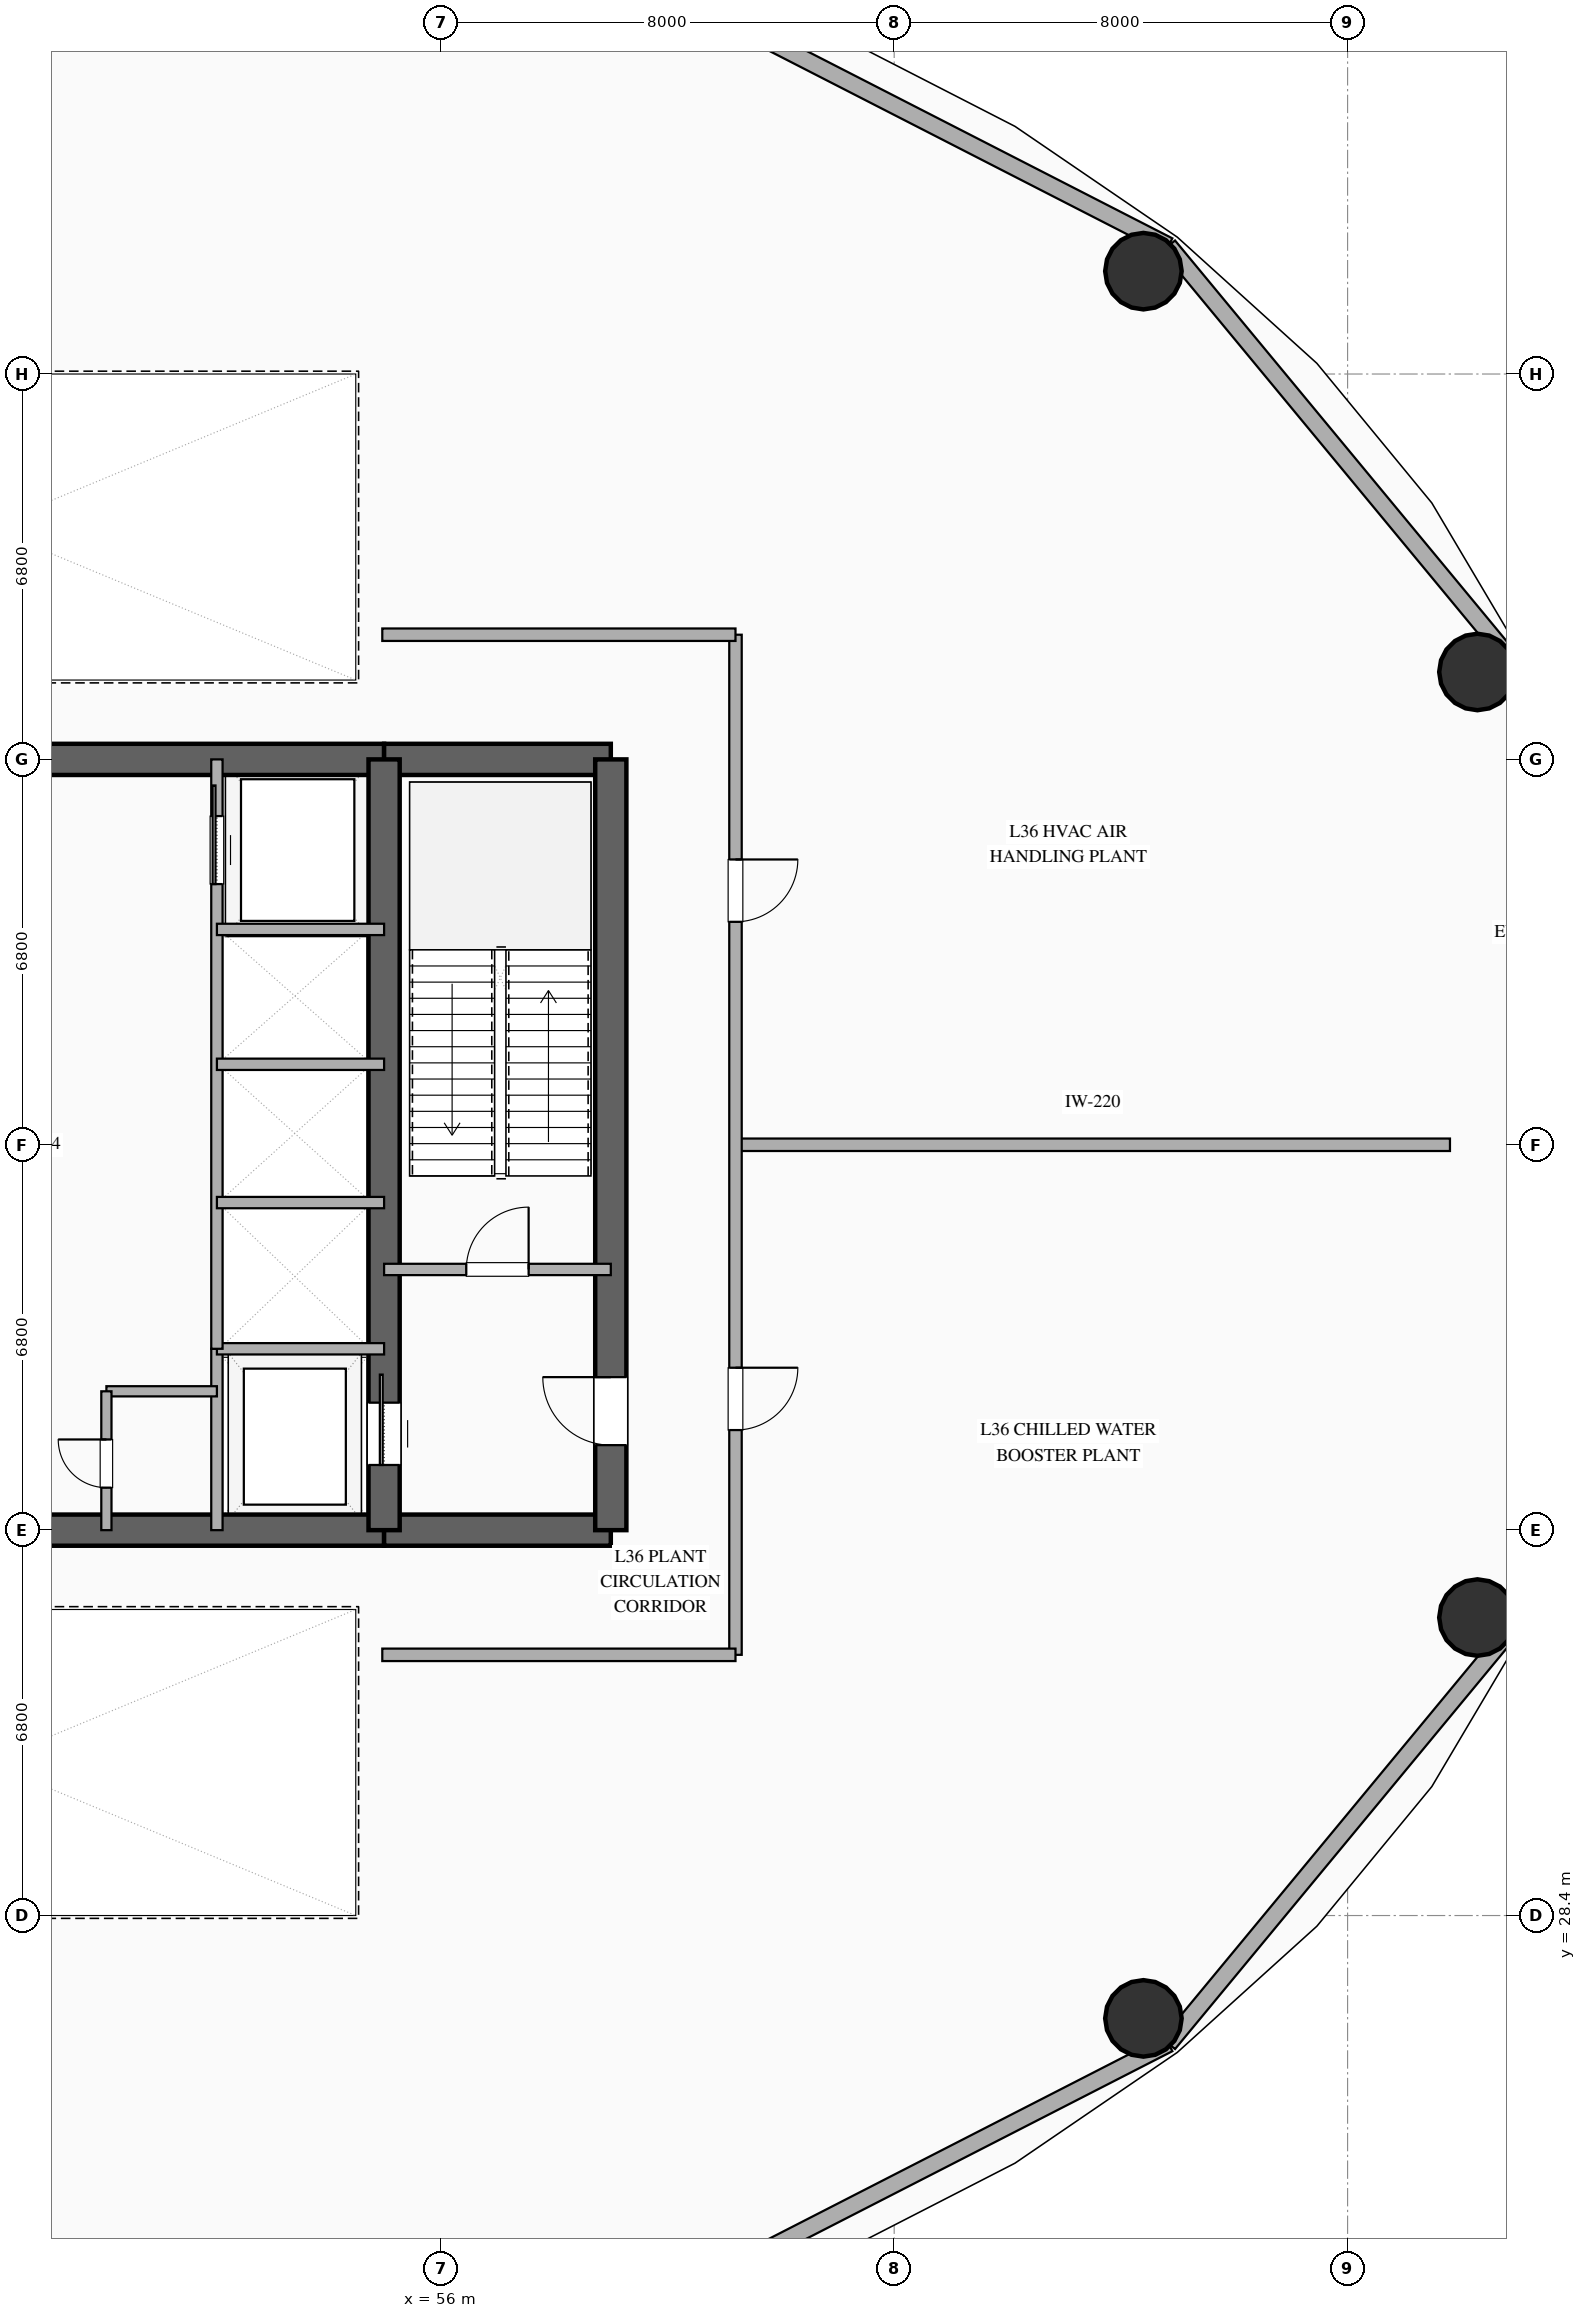
"""IFC4 building model, lengths in metres.
Left out: names, types, materials, properties, quantities, classifications, styles, units other than length and angle.
Written with IfcOpenShell. Run it as: python <this file> out.ifc"""

import sys

from ifc_helpers import new_model, si_unit, direction, frame, frame_2d, origin, origin_2d, place, context, subcontext, project, spatial, rectangle, hollow_circle, extrude, element, fill, save


model = new_model("IFC4")
c1 = context("Model", 3, precision=1e-05, world=origin(), true_north=direction((0.0, 1.0)))
c2 = subcontext(c1, "Body", "Model", "MODEL_VIEW")
j1 = project(units=[si_unit("LENGTHUNIT", "METRE"), si_unit("PLANEANGLEUNIT", "RADIAN")], contexts=[c1])
p1 = place(None, origin())
s1 = spatial("IfcSite", under=j1, at=p1, CompositionType="ELEMENT")
p2 = place(p1, origin())
s2 = spatial("IfcBuilding", under=s1, at=p2, CompositionType="ELEMENT")
p3 = place(p2, frame((0.0, 0.0, 145.2)))
s3 = spatial("IfcBuildingStorey", under=s2, at=p3, CompositionType="ELEMENT", Elevation=145.2)
p4 = place(p3, frame((41.0, 35.2, 0.0), z_axis=(0.0, 0.0, 1.0), x_axis=(1.0, 0.0, 0.0)))
e1 = element("IfcWall", 1, at=p4, inside=s3, PredefinedType="SHEAR", context=c2, shape_type="SweptSolid", body=[
    extrude(rectangle(XDim=14.0, YDim=0.55, at=frame_2d((7.0, 0.0))), origin(), (0.0, 0.0, 1.0), 5.15),
])
p5 = place(p4, frame((6.1, 0.0, 0.0)))
e2 = element("IfcOpeningElement", 2, at=p5, cuts=e1, PredefinedType="OPENING", context=c2, shape_type="SweptSolid", body=[
    extrude(rectangle(XDim=1.8, YDim=2.25, at=frame_2d((0.9, 1.125))), frame((0.0, 0.285, 0.0), z_axis=(0.0, -1.0, 0.0), x_axis=(1.0, 0.0, 0.0)), (0.0, 0.0, 1.0), 0.57),
])
p6 = place(p3, frame((55.0, 35.2, 0.0), z_axis=(0.0, 0.0, 1.0), x_axis=(1.0, 0.0, 0.0)))
e3 = element("IfcWall", 3, at=p6, inside=s3, PredefinedType="SHEAR", context=c2, shape_type="SweptSolid", body=[
    extrude(rectangle(XDim=4.0, YDim=0.55, at=frame_2d((2.0, 0.0))), origin(), (0.0, 0.0, 1.0), 5.15),
])
p7 = place(p3, frame((41.0, 48.8, 0.0), z_axis=(0.0, 0.0, 1.0), x_axis=(1.0, 0.0, 0.0)))
e4 = element("IfcWall", 4, at=p7, inside=s3, PredefinedType="SHEAR", context=c2, shape_type="SweptSolid", body=[
    extrude(rectangle(XDim=14.0, YDim=0.55, at=frame_2d((7.0, 0.0))), origin(), (0.0, 0.0, 1.0), 5.15),
])
p8 = place(p7, frame((6.1, 0.0, 0.0)))
e5 = element("IfcOpeningElement", 5, at=p8, cuts=e4, PredefinedType="OPENING", context=c2, shape_type="SweptSolid", body=[
    extrude(rectangle(XDim=1.8, YDim=2.25, at=frame_2d((0.9, 1.125))), frame((0.0, 0.285, 0.0), z_axis=(0.0, -1.0, 0.0), x_axis=(1.0, 0.0, 0.0)), (0.0, 0.0, 1.0), 0.57),
])
p9 = place(p3, frame((55.0, 48.8, 0.0), z_axis=(0.0, 0.0, 1.0), x_axis=(1.0, 0.0, 0.0)))
e6 = element("IfcWall", 6, at=p9, inside=s3, PredefinedType="SHEAR", context=c2, shape_type="SweptSolid", body=[
    extrude(rectangle(XDim=4.0, YDim=0.55, at=frame_2d((2.0, 0.0))), origin(), (0.0, 0.0, 1.0), 5.15),
])
p10 = place(p3, frame((59.0, 35.2, 0.0), z_axis=(0.0, 0.0, 1.0), x_axis=(0.0, 1.0, 0.0)))
e7 = element("IfcWall", 7, at=p10, inside=s3, PredefinedType="SHEAR", context=c2, shape_type="SweptSolid", body=[
    extrude(rectangle(XDim=13.6, YDim=0.55, at=frame_2d((6.8, 0.0))), origin(), (0.0, 0.0, 1.0), 5.15),
])
p11 = place(p10, frame((1.5, 0.0, 0.0)))
e8 = element("IfcOpeningElement", 8, at=p11, cuts=e7, PredefinedType="OPENING", context=c2, shape_type="SweptSolid", body=[
    extrude(rectangle(XDim=1.2, YDim=2.15, at=frame_2d((0.6, 1.075))), frame((0.0, 0.285, 0.0), z_axis=(0.0, -1.0, 0.0), x_axis=(1.0, 0.0, 0.0)), (0.0, 0.0, 1.0), 0.57),
])
p12 = place(p3, frame((55.0, 35.2, 0.0), z_axis=(0.0, 0.0, 1.0), x_axis=(0.0, 1.0, 0.0)))
e9 = element("IfcWall", 9, at=p12, inside=s3, PredefinedType="SHEAR", context=c2, shape_type="SweptSolid", body=[
    extrude(rectangle(XDim=13.6, YDim=0.55, at=frame_2d((6.8, 0.0))), origin(), (0.0, 0.0, 1.0), 5.15),
])
p13 = place(p12, frame((1.15, 0.0, 0.0)))
e10 = element("IfcOpeningElement", 10, at=p13, cuts=e9, PredefinedType="OPENING", context=c2, shape_type="SweptSolid", body=[
    extrude(rectangle(XDim=1.1, YDim=2.2, at=frame_2d((0.55, 1.1))), frame((0.0, 0.285, 0.0), z_axis=(0.0, -1.0, 0.0), x_axis=(1.0, 0.0, 0.0)), (0.0, 0.0, 1.0), 0.57),
])
for number, where, z_axis, x_axis in (
    (11, (74.291, 50.343, 0.0), (0.0, 0.0, 1.0), (1.0, 0.0, 0.0)),
    (12, (68.398, 57.415, 0.0), (0.0, 0.0, 1.0), (1.0, 0.0, 0.0)),
    (13, (68.398, 26.585, 0.0), (0.0, 0.0, 1.0), (1.0, 0.0, 0.0)),
    (14, (74.291, 33.657, 0.0), (0.0, 0.0, 1.0), (1.0, 0.0, 0.0)),
):
    element("IfcColumn", number, at=place(p3, frame(where, z_axis=z_axis, x_axis=x_axis)), inside=s3, PredefinedType="COLUMN", context=c2, shape_type="SweptSolid", body=[
        extrude(hollow_circle(Radius=0.675, WallThickness=0.036, at=origin_2d()), origin(), (0.0, 0.0, 1.0), 5.15),
    ])
p14 = place(p3, frame((76.849, 42.0, 0.0), z_axis=(0.0, 0.0, 1.0), x_axis=(-0.22558597182, 0.974223264616, 0.0)))
e15 = element("IfcWall", 15, at=p14, inside=s3, PredefinedType="SOLIDWALL", context=c2, shape_type="SweptSolid", body=[
    extrude(rectangle(XDim=8.811, YDim=0.3, at=frame_2d((4.405, 0.0))), origin(), (0.0, 0.0, 1.0), 5.15),
])
p15 = place(p3, frame((74.861, 50.583, 0.0), z_axis=(0.0, 0.0, 1.0), x_axis=(-0.637505817448, 0.770445541696, 0.0)))
e16 = element("IfcWall", 16, at=p15, inside=s3, PredefinedType="SOLIDWALL", context=c2, shape_type="SweptSolid", body=[
    extrude(rectangle(XDim=9.445, YDim=0.3, at=frame_2d((4.723, 0.0))), origin(), (0.0, 0.0, 1.0), 5.15),
])
for number, where, z_axis, x_axis in (
    (17, (68.84, 57.86, 0.0), (0.0, 0.0, 1.0), (-0.89, 0.456, 0.0)),
    (18, (59.351, 21.277, 0.0), (0.0, 0.0, 1.0), (0.89, 0.456, 0.0)),
):
    element("IfcWall", number, at=place(p3, frame(where, z_axis=z_axis, x_axis=x_axis)), inside=s3, PredefinedType="SOLIDWALL", context=c2, shape_type="SweptSolid", body=[
        extrude(rectangle(XDim=10.662, YDim=0.3, at=frame_2d((5.331, 0.0))), origin(), (0.0, 0.0, 1.0), 5.15),
    ])
p16 = place(p3, frame((68.84, 26.14, 0.0), z_axis=(0.0, 0.0, 1.0), x_axis=(0.637505817448, 0.770445541696, 0.0)))
e19 = element("IfcWall", 19, at=p16, inside=s3, PredefinedType="SOLIDWALL", context=c2, shape_type="SweptSolid", body=[
    extrude(rectangle(XDim=9.445, YDim=0.3, at=frame_2d((4.723, 0.0))), origin(), (0.0, 0.0, 1.0), 5.15),
])
p17 = place(p3, frame((74.861, 33.417, 0.0), z_axis=(0.0, 0.0, 1.0), x_axis=(0.22558597182, 0.974223264616, 0.0)))
e20 = element("IfcWall", 20, at=p17, inside=s3, PredefinedType="SOLIDWALL", context=c2, shape_type="SweptSolid", body=[
    extrude(rectangle(XDim=8.811, YDim=0.3, at=frame_2d((4.405, 0.0))), origin(), (0.0, 0.0, 1.0), 5.15),
])
p18 = place(p3, frame((55.0, 39.8, 0.0), z_axis=(0.0, 0.0, 1.0), x_axis=(1.0, 0.0, 0.0)))
e21 = element("IfcWall", 21, at=p18, inside=s3, PredefinedType="SOLIDWALL", context=c2, shape_type="SweptSolid", body=[
    extrude(rectangle(XDim=4.0, YDim=0.2, at=frame_2d((2.0, 0.0))), origin(), (0.0, 0.0, 1.0), 3.45),
])
p19 = place(p18, frame((1.45, 0.0, 0.0)))
e22 = element("IfcOpeningElement", 22, at=p19, cuts=e21, PredefinedType="OPENING", context=c2, shape_type="SweptSolid", body=[
    extrude(rectangle(XDim=1.1, YDim=2.15, at=frame_2d((0.55, 1.075))), frame((0.0, 0.11, 0.0), z_axis=(0.0, -1.0, 0.0), x_axis=(1.0, 0.0, 0.0)), (0.0, 0.0, 1.0), 0.22),
])
p20 = place(p3, frame((52.05, 35.2, 0.0), z_axis=(0.0, 0.0, 1.0), x_axis=(0.0, 1.0, 0.0)))
e23 = element("IfcWall", 23, at=p20, inside=s3, PredefinedType="SOLIDWALL", context=c2, shape_type="SweptSolid", body=[
    extrude(rectangle(XDim=3.2, YDim=0.2, at=frame_2d((1.6, 0.0))), origin(), (0.0, 0.0, 1.0), 3.45),
])
p21 = place(p3, frame((52.05, 38.4, 0.0), z_axis=(0.0, 0.0, 1.0), x_axis=(1.0, 0.0, 0.0)))
e24 = element("IfcWall", 24, at=p21, inside=s3, PredefinedType="SOLIDWALL", context=c2, shape_type="SweptSolid", body=[
    extrude(rectangle(XDim=2.95, YDim=0.2, at=frame_2d((1.475, 0.0))), origin(), (0.0, 0.0, 1.0), 3.45),
])
p22 = place(p3, frame((52.05, 38.4, 0.0), z_axis=(0.0, 0.0, 1.0), x_axis=(0.0, 1.0, 0.0)))
e25 = element("IfcWall", 25, at=p22, inside=s3, PredefinedType="SOLIDWALL", context=c2, shape_type="SweptSolid", body=[
    extrude(rectangle(XDim=10.4, YDim=0.2, at=frame_2d((5.2, 0.0))), origin(), (0.0, 0.0, 1.0), 3.45),
])
p23 = place(p22, frame((8.2, 0.0, 0.0)))
e26 = element("IfcOpeningElement", 26, at=p23, cuts=e25, PredefinedType="OPENING", context=c2, shape_type="SweptSolid", body=[
    extrude(rectangle(XDim=1.2, YDim=2.2, at=frame_2d((0.6, 1.1))), frame((0.0, 0.11, 0.0), z_axis=(0.0, -1.0, 0.0), x_axis=(1.0, 0.0, 0.0)), (0.0, 0.0, 1.0), 0.22),
])
for number, where, z_axis, x_axis in (
    (27, (52.05, 40.98, 0.0), (0.0, 0.0, 1.0), (1.0, 0.0, 0.0)),
    (28, (52.05, 43.42, 0.0), (0.0, 0.0, 1.0), (1.0, 0.0, 0.0)),
    (29, (52.05, 45.8, 0.0), (0.0, 0.0, 1.0), (1.0, 0.0, 0.0)),
):
    element("IfcWall", number, at=place(p3, frame(where, z_axis=z_axis, x_axis=x_axis)), inside=s3, PredefinedType="SOLIDWALL", context=c2, shape_type="SweptSolid", body=[
        extrude(rectangle(XDim=2.95, YDim=0.2, at=frame_2d((1.475, 0.0))), origin(), (0.0, 0.0, 1.0), 3.45),
    ])
p24 = place(p3, frame((50.1, 37.65, 0.0), z_axis=(0.0, 0.0, 1.0), x_axis=(1.0, 0.0, 0.0)))
e30 = element("IfcWall", 30, at=p24, inside=s3, PredefinedType="PLUMBINGWALL", context=c2, shape_type="SweptSolid", body=[
    extrude(rectangle(XDim=1.95, YDim=0.18, at=frame_2d((0.975, 0.0))), origin(), (0.0, 0.0, 1.0), 3.45),
])
p25 = place(p3, frame((50.1, 35.2, 0.0), z_axis=(0.0, 0.0, 1.0), x_axis=(0.0, 1.0, 0.0)))
e31 = element("IfcWall", 31, at=p25, inside=s3, PredefinedType="PLUMBINGWALL", context=c2, shape_type="SweptSolid", body=[
    extrude(rectangle(XDim=2.45, YDim=0.18, at=frame_2d((1.225, 0.0))), origin(), (0.0, 0.0, 1.0), 3.45),
])
p26 = place(p25, frame((0.75, 0.0, 0.0)))
e32 = element("IfcOpeningElement", 32, at=p26, cuts=e31, PredefinedType="OPENING", context=c2, shape_type="SweptSolid", body=[
    extrude(rectangle(XDim=0.85, YDim=2.1, at=frame_2d((0.425, 1.05))), frame((0.0, 0.1, 0.0), z_axis=(0.0, -1.0, 0.0), x_axis=(1.0, 0.0, 0.0)), (0.0, 0.0, 1.0), 0.2),
])
p27 = place(p3, frame((61.2, 42.0, 0.0), z_axis=(0.0, 0.0, 1.0), x_axis=(1.0, 0.0, 0.0)))
e33 = element("IfcWall", 33, at=p27, inside=s3, PredefinedType="SOLIDWALL", context=c2, shape_type="SweptSolid", body=[
    extrude(rectangle(XDim=12.607, YDim=0.22, at=frame_2d((6.303, 0.0))), origin(), (0.0, 0.0, 1.0), 3.45),
])
p28 = place(p3, frame((61.2, 51.0, 0.0), z_axis=(0.0, 0.0, 1.0), x_axis=(0.0, -1.0, 0.0)))
e34 = element("IfcWall", 34, at=p28, inside=s3, PredefinedType="SOLIDWALL", context=c2, shape_type="SweptSolid", body=[
    extrude(rectangle(XDim=18.0, YDim=0.22, at=frame_2d((9.0, 0.0))), origin(), (0.0, 0.0, 1.0), 3.45),
])
p29 = place(p28, frame((12.934, 0.0, 0.0)))
e35 = element("IfcOpeningElement", 35, at=p29, cuts=e34, PredefinedType="OPENING", context=c2, shape_type="SweptSolid", body=[
    extrude(rectangle(XDim=1.1, YDim=2.15, at=frame_2d((0.55, 1.075))), frame((0.0, 0.12, 0.0), z_axis=(0.0, -1.0, 0.0), x_axis=(1.0, 0.0, 0.0)), (0.0, 0.0, 1.0), 0.24),
])
p30 = place(p28, frame((3.966, 0.0, 0.0)))
e36 = element("IfcOpeningElement", 36, at=p30, cuts=e34, PredefinedType="OPENING", context=c2, shape_type="SweptSolid", body=[
    extrude(rectangle(XDim=1.1, YDim=2.15, at=frame_2d((0.55, 1.075))), frame((0.0, 0.12, 0.0), z_axis=(0.0, -1.0, 0.0), x_axis=(1.0, 0.0, 0.0)), (0.0, 0.0, 1.0), 0.24),
])
for number, where, z_axis, x_axis in (
    (37, (61.2, 33.0, 0.0), (0.0, 0.0, 1.0), (-1.0, 0.0, 0.0)),
    (38, (54.968, 51.0, 0.0), (0.0, 0.0, 1.0), (1.0, 0.0, 0.0)),
):
    element("IfcWall", number, at=place(p3, frame(where, z_axis=z_axis, x_axis=x_axis)), inside=s3, PredefinedType="SOLIDWALL", context=c2, shape_type="SweptSolid", body=[
        extrude(rectangle(XDim=6.232, YDim=0.22, at=frame_2d((3.116, 0.0))), origin(), (0.0, 0.0, 1.0), 3.45),
    ])
p31 = place(p13, origin())
e39 = element("IfcDoor", 39, at=p31, inside=s3, OperationType="SLIDING_TO_RIGHT", PredefinedType="DOOR", context=c2, shape_type="SweptSolid", body=[
    extrude(rectangle(XDim=1.1, YDim=2.2, at=frame_2d((0.55, 1.1))), frame((0.0, 0.025, 0.0), z_axis=(0.0, -1.0, 0.0), x_axis=(1.0, 0.0, 0.0)), (0.0, 0.0, 1.0), 0.05),
])
fill(e10, e39)
p32 = place(p11, origin())
e40 = element("IfcDoor", 40, at=p32, inside=s3, OperationType="SINGLE_SWING_RIGHT", PredefinedType="DOOR", context=c2, shape_type="SweptSolid", body=[
    extrude(rectangle(XDim=1.2, YDim=2.15, at=frame_2d((0.6, 1.075))), frame((0.0, 0.025, 0.0), z_axis=(0.0, -1.0, 0.0), x_axis=(1.0, 0.0, 0.0)), (0.0, 0.0, 1.0), 0.05),
])
fill(e8, e40)
p33 = place(p19, origin())
e41 = element("IfcDoor", 41, at=p33, inside=s3, OperationType="SINGLE_SWING_RIGHT", PredefinedType="DOOR", context=c2, shape_type="SweptSolid", body=[
    extrude(rectangle(XDim=1.1, YDim=2.15, at=frame_2d((0.55, 1.075))), frame((0.0, 0.025, 0.0), z_axis=(0.0, -1.0, 0.0), x_axis=(1.0, 0.0, 0.0)), (0.0, 0.0, 1.0), 0.05),
])
fill(e22, e41)
p34 = place(p23, origin())
e42 = element("IfcDoor", 42, at=p34, inside=s3, OperationType="SLIDING_TO_RIGHT", PredefinedType="DOOR", context=c2, shape_type="SweptSolid", body=[
    extrude(rectangle(XDim=1.2, YDim=2.2, at=frame_2d((0.6, 1.1))), frame((0.0, 0.025, 0.0), z_axis=(0.0, -1.0, 0.0), x_axis=(1.0, 0.0, 0.0)), (0.0, 0.0, 1.0), 0.05),
])
fill(e26, e42)
p35 = place(p26, origin())
e43 = element("IfcDoor", 43, at=p35, inside=s3, OperationType="SINGLE_SWING_RIGHT", PredefinedType="DOOR", context=c2, shape_type="SweptSolid", body=[
    extrude(rectangle(XDim=0.85, YDim=2.1, at=frame_2d((0.425, 1.05))), frame((0.0, 0.025, 0.0), z_axis=(0.0, -1.0, 0.0), x_axis=(1.0, 0.0, 0.0)), (0.0, 0.0, 1.0), 0.05),
])
fill(e32, e43)
p36 = place(p29, origin())
e44 = element("IfcDoor", 44, at=p36, inside=s3, OperationType="SINGLE_SWING_LEFT", PredefinedType="DOOR", context=c2, shape_type="SweptSolid", body=[
    extrude(rectangle(XDim=1.1, YDim=2.15, at=frame_2d((0.55, 1.075))), frame((0.0, 0.025, 0.0), z_axis=(0.0, -1.0, 0.0), x_axis=(1.0, 0.0, 0.0)), (0.0, 0.0, 1.0), 0.05),
])
fill(e35, e44)
p37 = place(p30, origin())
e45 = element("IfcDoor", 45, at=p37, inside=s3, OperationType="SINGLE_SWING_LEFT", PredefinedType="DOOR", context=c2, shape_type="SweptSolid", body=[
    extrude(rectangle(XDim=1.1, YDim=2.15, at=frame_2d((0.55, 1.075))), frame((0.0, 0.025, 0.0), z_axis=(0.0, -1.0, 0.0), x_axis=(1.0, 0.0, 0.0)), (0.0, 0.0, 1.0), 0.05),
])
fill(e36, e45)
save(model, sys.argv[1])
